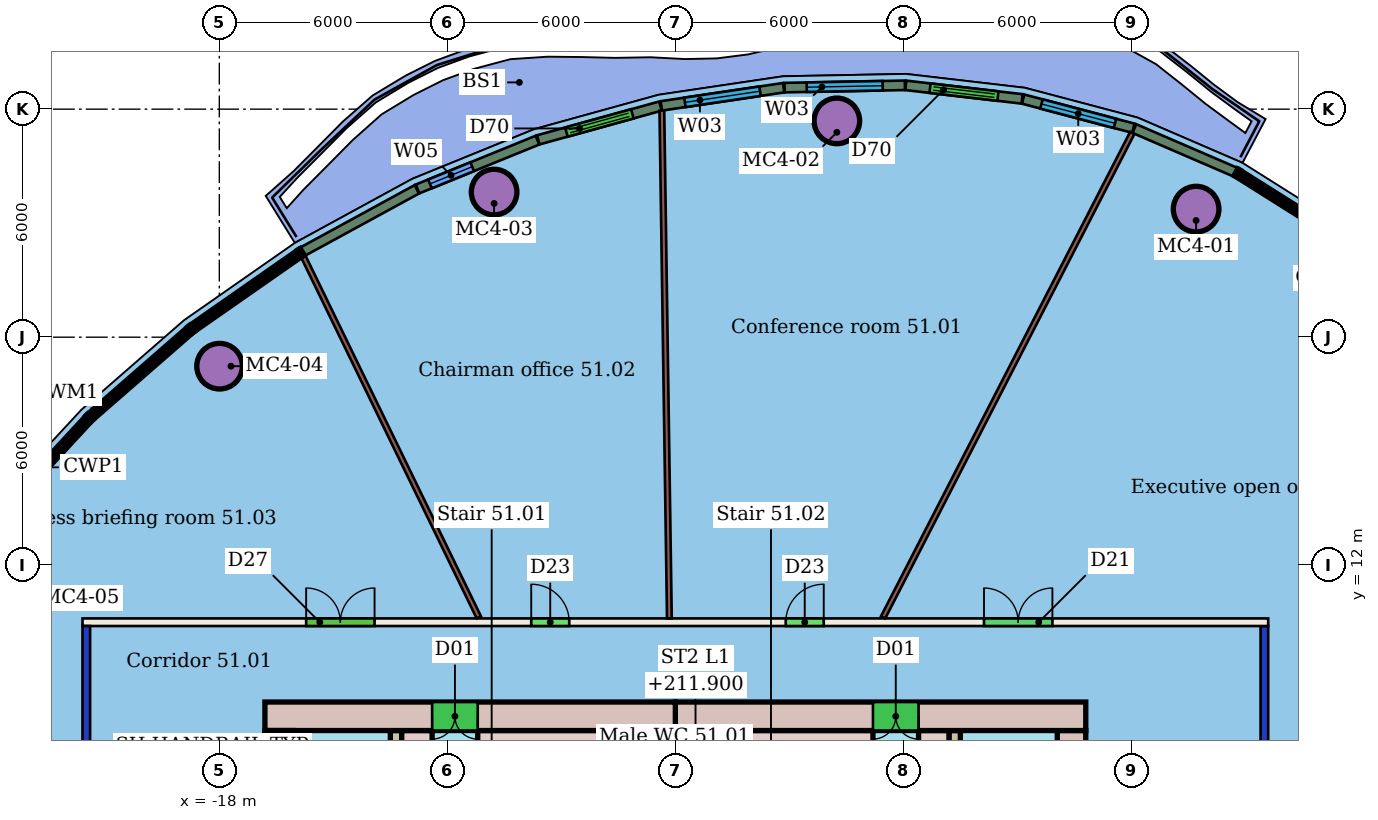
"""IFC4 building model, lengths in metres.
Left out: names, types, materials, properties, quantities, classifications, styles, units other than length and angle.
Written with IfcOpenShell. Run it as: python <this file> out.ifc"""

import sys

from ifc_helpers import new_model, si_unit, direction, frame, frame_2d, origin, origin_2d, place, context, subcontext, project, spatial, rectangle, hollow_circle, extrude, element, fill, save


model = new_model("IFC4")
c1 = context("Model", 3, precision=1e-05, world=origin(), true_north=direction((0.0, 1.0)))
c2 = subcontext(c1, "Body", "Model", "MODEL_VIEW")
j1 = project(units=[si_unit("LENGTHUNIT", "METRE"), si_unit("PLANEANGLEUNIT", "RADIAN")], contexts=[c1])
p1 = place(None, origin())
s1 = spatial("IfcSite", under=j1, at=p1, CompositionType="ELEMENT")
p2 = place(p1, origin())
s2 = spatial("IfcBuilding", under=s1, at=p2, CompositionType="ELEMENT")
p3 = place(p2, frame((0.0, 0.0, 210.1)))
s3 = spatial("IfcBuildingStorey", under=s2, at=p3, CompositionType="ELEMENT", Elevation=210.1)
for number, where, z_axis, x_axis in (
    (1, (7.704, 21.37, 0.0), (0.0, 0.0, 1.0), (1.0, 0.0, 0.0)),
    (2, (-1.75, 23.691, 0.0), (0.0, 0.0, 1.0), (1.0, 0.0, 0.0)),
    (3, (-10.769, 21.819, 0.0), (0.0, 0.0, 1.0), (1.0, 0.0, 0.0)),
    (4, (-17.993, 17.237, 0.0), (0.0, 0.0, 1.0), (1.0, 0.0, 0.0)),
):
    element("IfcColumn", number, at=place(p3, frame(where, z_axis=z_axis, x_axis=x_axis)), inside=s3, PredefinedType="COLUMN", context=c2, shape_type="SweptSolid", body=[
        extrude(hollow_circle(Radius=0.6, WallThickness=0.045, at=origin_2d()), origin(), (0.0, 0.0, 1.0), 3.45),
    ])
p4 = place(p3, frame((-21.5, -10.4, 0.0), z_axis=(0.0, 0.0, 1.0), x_axis=(0.0, 1.0, 0.0)))
e5 = element("IfcWall", 5, at=p4, inside=s3, PredefinedType="PARTITIONING", context=c2, shape_type="SweptSolid", body=[
    extrude(rectangle(XDim=20.8, YDim=0.2, at=frame_2d((10.4, 0.0))), origin(), (0.0, 0.0, 1.0), 3.05),
])
p5 = place(p4, frame((6.277, 0.0, 0.0)))
e6 = element("IfcOpeningElement", 6, at=p5, cuts=e5, PredefinedType="OPENING", context=c2, shape_type="SweptSolid", body=[
    extrude(rectangle(XDim=1.8, YDim=2.1, at=frame_2d((0.9, 1.05))), frame((0.0, 0.11, 0.0), z_axis=(0.0, -1.0, 0.0), x_axis=(1.0, 0.0, 0.0)), (0.0, 0.0, 1.0), 0.22),
])
p6 = place(p3, frame((-21.6, 10.5, 0.0), z_axis=(0.0, 0.0, 1.0), x_axis=(1.0, 0.0, 0.0)))
e7 = element("IfcWall", 7, at=p6, inside=s3, PredefinedType="PARTITIONING", context=c2, shape_type="SweptSolid", body=[
    extrude(rectangle(XDim=31.2, YDim=0.2, at=frame_2d((15.6, 0.0))), origin(), (0.0, 0.0, 1.0), 3.45),
])
p7 = place(p6, frame((18.505, 0.0, 0.0)))
e8 = element("IfcOpeningElement", 8, at=p7, cuts=e7, PredefinedType="OPENING", context=c2, shape_type="SweptSolid", body=[
    extrude(rectangle(XDim=1.0, YDim=2.4, at=frame_2d((0.5, 1.2))), frame((0.0, 0.11, 0.0), z_axis=(0.0, -1.0, 0.0), x_axis=(1.0, 0.0, 0.0)), (0.0, 0.0, 1.0), 0.22),
])
p8 = place(p6, frame((11.808, 0.0, 0.0)))
e9 = element("IfcOpeningElement", 9, at=p8, cuts=e7, PredefinedType="OPENING", context=c2, shape_type="SweptSolid", body=[
    extrude(rectangle(XDim=1.0, YDim=2.4, at=frame_2d((0.5, 1.2))), frame((0.0, 0.11, 0.0), z_axis=(0.0, -1.0, 0.0), x_axis=(1.0, 0.0, 0.0)), (0.0, 0.0, 1.0), 0.22),
])
p9 = place(p6, frame((5.885, 0.0, 0.0)))
e10 = element("IfcOpeningElement", 10, at=p9, cuts=e7, PredefinedType="OPENING", context=c2, shape_type="SweptSolid", body=[
    extrude(rectangle(XDim=1.8, YDim=2.4, at=frame_2d((0.9, 1.2))), frame((0.0, 0.11, 0.0), z_axis=(0.0, -1.0, 0.0), x_axis=(1.0, 0.0, 0.0)), (0.0, 0.0, 1.0), 0.22),
])
p10 = place(p6, frame((23.722, 0.0, 0.0)))
e11 = element("IfcOpeningElement", 11, at=p10, cuts=e7, PredefinedType="OPENING", context=c2, shape_type="SweptSolid", body=[
    extrude(rectangle(XDim=1.8, YDim=2.1, at=frame_2d((0.9, 1.05))), frame((0.0, 0.11, 0.0), z_axis=(0.0, -1.0, 0.0), x_axis=(1.0, 0.0, 0.0)), (0.0, 0.0, 1.0), 0.22),
])
p11 = place(p3, frame((9.5, 10.4, 0.0), z_axis=(0.0, 0.0, 1.0), x_axis=(0.0, -1.0, 0.0)))
e12 = element("IfcWall", 12, at=p11, inside=s3, PredefinedType="PARTITIONING", context=c2, shape_type="SweptSolid", body=[
    extrude(rectangle(XDim=20.8, YDim=0.2, at=frame_2d((10.4, 0.0))), origin(), (0.0, 0.0, 1.0), 3.05),
])
p12 = place(p11, frame((11.307, 0.0, 0.0)))
e13 = element("IfcOpeningElement", 13, at=p12, cuts=e12, PredefinedType="OPENING", context=c2, shape_type="SweptSolid", body=[
    extrude(rectangle(XDim=1.5, YDim=2.1, at=frame_2d((0.75, 1.05))), frame((0.0, 0.11, 0.0), z_axis=(0.0, -1.0, 0.0), x_axis=(1.0, 0.0, 0.0)), (0.0, 0.0, 1.0), 0.22),
])
p13 = place(p3, frame((6.025, 23.377, 0.0), z_axis=(0.0, 0.0, 1.0), x_axis=(-0.457443054826, -0.889238917047, 0.0)))
e14 = element("IfcWall", 14, at=p13, inside=s3, PredefinedType="PARTITIONING", context=c2, shape_type="SweptSolid", body=[
    extrude(rectangle(XDim=14.336, YDim=0.125, at=frame_2d((7.168, 0.0))), origin(), (0.0, 0.0, 1.0), 3.45),
])
p14 = place(p3, frame((-6.355, 23.962, 0.0), z_axis=(0.0, 0.0, 1.0), x_axis=(0.014799117337, -0.999890487066, 0.0)))
e15 = element("IfcWall", 15, at=p14, inside=s3, PredefinedType="PARTITIONING", context=c2, shape_type="SweptSolid", body=[
    extrude(rectangle(XDim=13.363, YDim=0.125, at=frame_2d((6.681, 0.0))), origin(), (0.0, 0.0, 1.0), 3.45),
])
p15 = place(p3, frame((-15.789, 20.12, 0.0), z_axis=(0.0, 0.0, 1.0), x_axis=(0.437510703661, -0.899213202851, 0.0)))
e16 = element("IfcWall", 16, at=p15, inside=s3, PredefinedType="PARTITIONING", context=c2, shape_type="SweptSolid", body=[
    extrude(rectangle(XDim=10.556, YDim=0.125, at=frame_2d((5.278, 0.0))), origin(), (0.0, 0.0, 1.0), 3.45),
])
p16 = place(p3, frame((18.402, 8.403, 0.0), z_axis=(0.0, 0.0, 1.0), x_axis=(-0.945508934878, -0.325596151798, 0.0)))
e17 = element("IfcWall", 17, at=p16, inside=s3, PredefinedType="PARTITIONING", context=c2, shape_type="SweptSolid", body=[
    extrude(rectangle(XDim=9.288, YDim=0.125, at=frame_2d((4.644, 0.0))), origin(), (0.0, 0.0, 1.0), 3.45),
])
p17 = place(p3, frame((8.735, 22.343, 0.0), z_axis=(0.0, 0.0, 1.0), x_axis=(-0.918186540839, 0.396148300794, 0.0)))
e18 = element("IfcWall", 18, at=p17, inside=s3, PredefinedType="SOLIDWALL", context=c2, shape_type="SweptSolid", body=[
    extrude(rectangle(XDim=2.894, YDim=0.25, at=frame_2d((1.447, 0.0))), origin(), (0.0, 0.0, 1.0), 3.1),
])
p18 = place(p3, frame((6.053, 23.498, 0.0), z_axis=(0.0, 0.0, 1.0), x_axis=(-0.966837064295, 0.255393991914, 0.0)))
e19 = element("IfcWall", 19, at=p18, inside=s3, PredefinedType="SOLIDWALL", context=c2, shape_type="SweptSolid", body=[
    extrude(rectangle(XDim=3.002, YDim=0.25, at=frame_2d((1.501, 0.0))), origin(), (0.0, 0.0, 1.0), 3.1),
])
p19 = place(p18, frame((0.501, 0.0, 0.9)))
e20 = element("IfcOpeningElement", 20, at=p19, cuts=e19, PredefinedType="OPENING", context=c2, shape_type="SweptSolid", body=[
    extrude(rectangle(XDim=2.0, YDim=2.1, at=frame_2d((1.0, 1.05))), frame((0.0, 0.135, 0.0), z_axis=(0.0, -1.0, 0.0), x_axis=(1.0, 0.0, 0.0)), (0.0, 0.0, 1.0), 0.27),
])
p20 = place(p3, frame((3.125, 24.27, 0.0), z_axis=(0.0, 0.0, 1.0), x_axis=(-0.993285162652, 0.115691770042, 0.0)))
e21 = element("IfcWall", 21, at=p20, inside=s3, PredefinedType="SOLIDWALL", context=c2, shape_type="SweptSolid", body=[
    extrude(rectangle(XDim=3.081, YDim=0.25, at=frame_2d((1.541, 0.0))), origin(), (0.0, 0.0, 1.0), 3.1),
])
p21 = place(p20, frame((0.641, 0.0, 0.0)))
e22 = element("IfcOpeningElement", 22, at=p21, cuts=e21, PredefinedType="OPENING", context=c2, shape_type="SweptSolid", body=[
    extrude(rectangle(XDim=1.8, YDim=2.4, at=frame_2d((0.9, 1.2))), frame((0.0, 0.135, 0.0), z_axis=(0.0, -1.0, 0.0), x_axis=(1.0, 0.0, 0.0)), (0.0, 0.0, 1.0), 0.27),
])
p22 = place(p3, frame((0.04, 24.627, 0.0), z_axis=(0.0, 0.0, 1.0), x_axis=(-0.999814312732, -0.019270185659, 0.0)))
e23 = element("IfcWall", 23, at=p22, inside=s3, PredefinedType="SOLIDWALL", context=c2, shape_type="SweptSolid", body=[
    extrude(rectangle(XDim=3.167, YDim=0.25, at=frame_2d((1.583, 0.0))), origin(), (0.0, 0.0, 1.0), 3.1),
])
p23 = place(p22, frame((0.584, 0.0, 0.9)))
e24 = element("IfcOpeningElement", 24, at=p23, cuts=e23, PredefinedType="OPENING", context=c2, shape_type="SweptSolid", body=[
    extrude(rectangle(XDim=2.0, YDim=2.1, at=frame_2d((1.0, 1.05))), frame((0.0, 0.135, 0.0), z_axis=(0.0, -1.0, 0.0), x_axis=(1.0, 0.0, 0.0)), (0.0, 0.0, 1.0), 0.27),
])
p24 = place(p3, frame((-3.15, 24.564, 0.0), z_axis=(0.0, 0.0, 1.0), x_axis=(-0.989129217208, -0.147048943092, 0.0)))
e25 = element("IfcWall", 25, at=p24, inside=s3, PredefinedType="SOLIDWALL", context=c2, shape_type="SweptSolid", body=[
    extrude(rectangle(XDim=3.254, YDim=0.25, at=frame_2d((1.627, 0.0))), origin(), (0.0, 0.0, 1.0), 3.1),
])
p25 = place(p24, frame((0.627, 0.0, 0.9)))
e26 = element("IfcOpeningElement", 26, at=p25, cuts=e25, PredefinedType="OPENING", context=c2, shape_type="SweptSolid", body=[
    extrude(rectangle(XDim=2.0, YDim=2.1, at=frame_2d((1.0, 1.05))), frame((0.0, 0.135, 0.0), z_axis=(0.0, -1.0, 0.0), x_axis=(1.0, 0.0, 0.0)), (0.0, 0.0, 1.0), 0.27),
])
p26 = place(p3, frame((-6.392, 24.081, 0.0), z_axis=(0.0, 0.0, 1.0), x_axis=(-0.963820322112, -0.266552784048, 0.0)))
e27 = element("IfcWall", 27, at=p26, inside=s3, PredefinedType="SOLIDWALL", context=c2, shape_type="SweptSolid", body=[
    extrude(rectangle(XDim=3.336, YDim=0.25, at=frame_2d((1.668, 0.0))), origin(), (0.0, 0.0, 1.0), 3.1),
])
p27 = place(p26, frame((0.768, 0.0, 0.0)))
e28 = element("IfcOpeningElement", 28, at=p27, cuts=e27, PredefinedType="OPENING", context=c2, shape_type="SweptSolid", body=[
    extrude(rectangle(XDim=1.8, YDim=2.4, at=frame_2d((0.9, 1.2))), frame((0.0, 0.135, 0.0), z_axis=(0.0, -1.0, 0.0), x_axis=(1.0, 0.0, 0.0)), (0.0, 0.0, 1.0), 0.27),
])
p28 = place(p3, frame((-9.628, 23.185, 0.0), z_axis=(0.0, 0.0, 1.0), x_axis=(-0.926160966141, -0.377128446019, 0.0)))
e29 = element("IfcWall", 29, at=p28, inside=s3, PredefinedType="SOLIDWALL", context=c2, shape_type="SweptSolid", body=[
    extrude(rectangle(XDim=3.407, YDim=0.25, at=frame_2d((1.704, 0.0))), origin(), (0.0, 0.0, 1.0), 3.1),
])
p29 = place(p28, frame((1.854, 0.0, 0.9)))
e30 = element("IfcOpeningElement", 30, at=p29, cuts=e29, PredefinedType="OPENING", context=c2, shape_type="SweptSolid", body=[
    extrude(rectangle(XDim=1.2, YDim=2.1, at=frame_2d((0.6, 1.05))), frame((0.0, 0.135, 0.0), z_axis=(0.0, -1.0, 0.0), x_axis=(1.0, 0.0, 0.0)), (0.0, 0.0, 1.0), 0.27),
])
p30 = place(p3, frame((-12.804, 21.89, 0.0), z_axis=(0.0, 0.0, 1.0), x_axis=(-0.877865563138, -0.478907144503, 0.0)))
e31 = element("IfcWall", 31, at=p30, inside=s3, PredefinedType="SOLIDWALL", context=c2, shape_type="SweptSolid", body=[
    extrude(rectangle(XDim=3.42, YDim=0.25, at=frame_2d((1.71, 0.0))), origin(), (0.0, 0.0, 1.0), 3.1),
])
p31 = place(p3, frame((4.8, 8.025, 0.0), z_axis=(0.0, 0.0, 1.0), x_axis=(-1.0, 0.0, 0.0)))
e32 = element("IfcWall", 32, at=p31, inside=s3, PredefinedType="SHEAR", context=c2, shape_type="SweptSolid", body=[
    extrude(rectangle(XDim=10.8, YDim=0.75, at=frame_2d((5.4, 0.0))), origin(), (0.0, 0.0, 1.0), 3.3),
])
p32 = place(p31, frame((4.4, 0.0, 0.0)))
e33 = element("IfcOpeningElement", 33, at=p32, cuts=e32, PredefinedType="OPENING", context=c2, shape_type="SweptSolid", body=[
    extrude(rectangle(XDim=1.2, YDim=2.1, at=frame_2d((0.6, 1.05))), frame((0.0, 0.385, 0.0), z_axis=(0.0, -1.0, 0.0), x_axis=(1.0, 0.0, 0.0)), (0.0, 0.0, 1.0), 0.77),
])
p33 = place(p3, frame((-6.0, 8.025, 0.0), z_axis=(0.0, 0.0, 1.0), x_axis=(-1.0, 0.0, 0.0)))
e34 = element("IfcWall", 34, at=p33, inside=s3, PredefinedType="SHEAR", context=c2, shape_type="SweptSolid", body=[
    extrude(rectangle(XDim=10.8, YDim=0.75, at=frame_2d((5.4, 0.0))), origin(), (0.0, 0.0, 1.0), 3.3),
])
p34 = place(p33, frame((5.2, 0.0, 0.0)))
e35 = element("IfcOpeningElement", 35, at=p34, cuts=e34, PredefinedType="OPENING", context=c2, shape_type="SweptSolid", body=[
    extrude(rectangle(XDim=1.2, YDim=2.1, at=frame_2d((0.6, 1.05))), frame((0.0, 0.385, 0.0), z_axis=(0.0, -1.0, 0.0), x_axis=(1.0, 0.0, 0.0)), (0.0, 0.0, 1.0), 0.77),
])
p35 = place(p3, frame((-16.425, 7.65, 0.0), z_axis=(0.0, 0.0, 1.0), x_axis=(0.0, -1.0, 0.0)))
e36 = element("IfcWall", 36, at=p35, inside=s3, PredefinedType="SHEAR", context=c2, shape_type="SweptSolid", body=[
    extrude(rectangle(XDim=15.3, YDim=0.75, at=frame_2d((7.65, 0.0))), origin(), (0.0, 0.0, 1.0), 3.3),
])
p36 = place(p35, frame((11.25, 0.0, 0.0)))
e37 = element("IfcOpeningElement", 37, at=p36, cuts=e36, PredefinedType="OPENING", context=c2, shape_type="SweptSolid", body=[
    extrude(rectangle(XDim=1.2, YDim=2.1, at=frame_2d((0.6, 1.05))), frame((0.0, 0.385, 0.0), z_axis=(0.0, -1.0, 0.0), x_axis=(1.0, 0.0, 0.0)), (0.0, 0.0, 1.0), 0.77),
])
p37 = place(p35, frame((2.85, 0.0, 0.0)))
e38 = element("IfcOpeningElement", 38, at=p37, cuts=e36, PredefinedType="OPENING", context=c2, shape_type="SweptSolid", body=[
    extrude(rectangle(XDim=1.2, YDim=2.1, at=frame_2d((0.6, 1.05))), frame((0.0, 0.385, 0.0), z_axis=(0.0, -1.0, 0.0), x_axis=(1.0, 0.0, 0.0)), (0.0, 0.0, 1.0), 0.77),
])
p38 = place(p3, frame((4.425, -7.65, 0.0), z_axis=(0.0, 0.0, 1.0), x_axis=(0.0, 1.0, 0.0)))
e39 = element("IfcWall", 39, at=p38, inside=s3, PredefinedType="SHEAR", context=c2, shape_type="SweptSolid", body=[
    extrude(rectangle(XDim=15.3, YDim=0.75, at=frame_2d((7.65, 0.0))), origin(), (0.0, 0.0, 1.0), 3.3),
])
p39 = place(p38, frame((2.85, 0.0, 0.0)))
e40 = element("IfcOpeningElement", 40, at=p39, cuts=e39, PredefinedType="OPENING", context=c2, shape_type="SweptSolid", body=[
    extrude(rectangle(XDim=1.2, YDim=2.1, at=frame_2d((0.6, 1.05))), frame((0.0, 0.385, 0.0), z_axis=(0.0, -1.0, 0.0), x_axis=(1.0, 0.0, 0.0)), (0.0, 0.0, 1.0), 0.77),
])
p40 = place(p38, frame((11.25, 0.0, 0.0)))
e41 = element("IfcOpeningElement", 41, at=p40, cuts=e39, PredefinedType="OPENING", context=c2, shape_type="SweptSolid", body=[
    extrude(rectangle(XDim=1.2, YDim=2.1, at=frame_2d((0.6, 1.05))), frame((0.0, 0.385, 0.0), z_axis=(0.0, -1.0, 0.0), x_axis=(1.0, 0.0, 0.0)), (0.0, 0.0, 1.0), 0.77),
])
p41 = place(p3, frame((-13.35, 7.65, 0.0), z_axis=(0.0, 0.0, 1.0), x_axis=(0.0, -1.0, 0.0)))
e42 = element("IfcWall", 42, at=p41, inside=s3, PredefinedType="SHEAR", context=c2, shape_type="SweptSolid", body=[
    extrude(rectangle(XDim=15.3, YDim=0.3, at=frame_2d((7.65, 0.0))), origin(), (0.0, 0.0, 1.0), 3.3),
])
p42 = place(p41, frame((6.9, 0.0, 0.0)))
e43 = element("IfcOpeningElement", 43, at=p42, cuts=e42, PredefinedType="OPENING", context=c2, shape_type="SweptSolid", body=[
    extrude(rectangle(XDim=1.5, YDim=2.1, at=frame_2d((0.75, 1.05))), frame((0.0, 0.16, 0.0), z_axis=(0.0, -1.0, 0.0), x_axis=(1.0, 0.0, 0.0)), (0.0, 0.0, 1.0), 0.32),
])
p43 = place(p3, frame((1.35, -7.65, 0.0), z_axis=(0.0, 0.0, 1.0), x_axis=(0.0, 1.0, 0.0)))
e44 = element("IfcWall", 44, at=p43, inside=s3, PredefinedType="SHEAR", context=c2, shape_type="SweptSolid", body=[
    extrude(rectangle(XDim=15.3, YDim=0.3, at=frame_2d((7.65, 0.0))), origin(), (0.0, 0.0, 1.0), 3.3),
])
p44 = place(p43, frame((1.56, 0.0, 0.0)))
e45 = element("IfcOpeningElement", 45, at=p44, cuts=e44, PredefinedType="OPENING", context=c2, shape_type="SweptSolid", body=[
    extrude(rectangle(XDim=1.0, YDim=2.1, at=frame_2d((0.5, 1.05))), frame((0.0, 0.16, 0.0), z_axis=(0.0, -1.0, 0.0), x_axis=(1.0, 0.0, 0.0)), (0.0, 0.0, 1.0), 0.32),
])
p45 = place(p43, frame((6.9, 0.0, 0.0)))
e46 = element("IfcOpeningElement", 46, at=p45, cuts=e44, PredefinedType="OPENING", context=c2, shape_type="SweptSolid", body=[
    extrude(rectangle(XDim=1.5, YDim=2.1, at=frame_2d((0.75, 1.05))), frame((0.0, 0.16, 0.0), z_axis=(0.0, -1.0, 0.0), x_axis=(1.0, 0.0, 0.0)), (0.0, 0.0, 1.0), 0.32),
])
p46 = place(p3, frame((-6.0, 3.88, 0.0), z_axis=(0.0, 0.0, 1.0), x_axis=(0.0, 1.0, 0.0)))
e47 = element("IfcWall", 47, at=p46, inside=s3, PredefinedType="SHEAR", context=c2, shape_type="SweptSolid", body=[
    extrude(rectangle(XDim=3.77, YDim=0.3, at=frame_2d((1.885, 0.0))), origin(), (0.0, 0.0, 1.0), 3.3),
])
p47 = place(p3, frame((-13.2, 7.475, 0.0), z_axis=(0.0, 0.0, 1.0), x_axis=(1.0, 0.0, 0.0)))
e48 = element("IfcWall", 48, at=p47, inside=s3, PredefinedType="SHEAR", context=c2, shape_type="SweptSolid", body=[
    extrude(rectangle(XDim=0.8, YDim=0.35, at=frame_2d((0.4, 0.0))), origin(), (0.0, 0.0, 1.0), 3.3),
])
for number, where, z_axis, x_axis in (
    (49, (-11.2, 7.475, 0.0), (0.0, 0.0, 1.0), (1.0, 0.0, 0.0)),
    (50, (-5.85, 7.475, 0.0), (0.0, 0.0, 1.0), (1.0, 0.0, 0.0)),
):
    element("IfcWall", number, at=place(p3, frame(where, z_axis=z_axis, x_axis=x_axis)), inside=s3, PredefinedType="SHEAR", context=c2, shape_type="SweptSolid", body=[
        extrude(rectangle(XDim=5.05, YDim=0.35, at=frame_2d((2.525, 0.0))), origin(), (0.0, 0.0, 1.0), 3.3),
    ])
p48 = place(p3, frame((0.4, 7.475, 0.0), z_axis=(0.0, 0.0, 1.0), x_axis=(1.0, 0.0, 0.0)))
e51 = element("IfcWall", 51, at=p48, inside=s3, PredefinedType="SHEAR", context=c2, shape_type="SweptSolid", body=[
    extrude(rectangle(XDim=0.8, YDim=0.35, at=frame_2d((0.4, 0.0))), origin(), (0.0, 0.0, 1.0), 3.3),
])
p49 = place(p7, origin())
e52 = element("IfcDoor", 52, at=p49, inside=s3, OperationType="SINGLE_SWING_RIGHT", PredefinedType="DOOR", context=c2, shape_type="SweptSolid", body=[
    extrude(rectangle(XDim=1.0, YDim=2.4, at=frame_2d((0.5, 1.2))), frame((0.0, 0.025, 0.0), z_axis=(0.0, -1.0, 0.0), x_axis=(1.0, 0.0, 0.0)), (0.0, 0.0, 1.0), 0.05),
])
fill(e8, e52)
p50 = place(p8, origin())
e53 = element("IfcDoor", 53, at=p50, inside=s3, OperationType="SINGLE_SWING_LEFT", PredefinedType="DOOR", context=c2, shape_type="SweptSolid", body=[
    extrude(rectangle(XDim=1.0, YDim=2.4, at=frame_2d((0.5, 1.2))), frame((0.0, 0.025, 0.0), z_axis=(0.0, -1.0, 0.0), x_axis=(1.0, 0.0, 0.0)), (0.0, 0.0, 1.0), 0.05),
])
fill(e9, e53)
p51 = place(p9, origin())
e54 = element("IfcDoor", 54, at=p51, inside=s3, OperationType="DOUBLE_DOOR_SINGLE_SWING", PredefinedType="DOOR", context=c2, shape_type="SweptSolid", body=[
    extrude(rectangle(XDim=1.8, YDim=2.4, at=frame_2d((0.9, 1.2))), frame((0.0, 0.025, 0.0), z_axis=(0.0, -1.0, 0.0), x_axis=(1.0, 0.0, 0.0)), (0.0, 0.0, 1.0), 0.05),
])
fill(e10, e54)
p52 = place(p10, origin())
e55 = element("IfcDoor", 55, at=p52, inside=s3, OperationType="DOUBLE_DOOR_SINGLE_SWING", PredefinedType="DOOR", context=c2, shape_type="SweptSolid", body=[
    extrude(rectangle(XDim=1.8, YDim=2.1, at=frame_2d((0.9, 1.05))), frame((0.0, 0.025, 0.0), z_axis=(0.0, -1.0, 0.0), x_axis=(1.0, 0.0, 0.0)), (0.0, 0.0, 1.0), 0.05),
])
fill(e11, e55)
p53 = place(p19, origin())
e56 = element("IfcWindow", 56, at=p53, inside=s3, PartitioningType="SINGLE_PANEL", PredefinedType="WINDOW", context=c2, shape_type="SweptSolid", body=[
    extrude(rectangle(XDim=2.0, YDim=2.1, at=frame_2d((1.0, 1.05))), frame((0.0, 0.03, 0.0), z_axis=(0.0, -1.0, 0.0), x_axis=(1.0, 0.0, 0.0)), (0.0, 0.0, 1.0), 0.06),
])
fill(e20, e56)
p54 = place(p21, origin())
e57 = element("IfcDoor", 57, at=p54, inside=s3, OperationType="DOUBLE_DOOR_SLIDING", PredefinedType="DOOR", context=c2, shape_type="SweptSolid", body=[
    extrude(rectangle(XDim=1.8, YDim=2.4, at=frame_2d((0.9, 1.2))), frame((0.0, 0.025, 0.0), z_axis=(0.0, -1.0, 0.0), x_axis=(1.0, 0.0, 0.0)), (0.0, 0.0, 1.0), 0.05),
])
fill(e22, e57)
p55 = place(p23, origin())
e58 = element("IfcWindow", 58, at=p55, inside=s3, PartitioningType="SINGLE_PANEL", PredefinedType="WINDOW", context=c2, shape_type="SweptSolid", body=[
    extrude(rectangle(XDim=2.0, YDim=2.1, at=frame_2d((1.0, 1.05))), frame((0.0, 0.03, 0.0), z_axis=(0.0, -1.0, 0.0), x_axis=(1.0, 0.0, 0.0)), (0.0, 0.0, 1.0), 0.06),
])
fill(e24, e58)
p56 = place(p25, origin())
e59 = element("IfcWindow", 59, at=p56, inside=s3, PartitioningType="SINGLE_PANEL", PredefinedType="WINDOW", context=c2, shape_type="SweptSolid", body=[
    extrude(rectangle(XDim=2.0, YDim=2.1, at=frame_2d((1.0, 1.05))), frame((0.0, 0.03, 0.0), z_axis=(0.0, -1.0, 0.0), x_axis=(1.0, 0.0, 0.0)), (0.0, 0.0, 1.0), 0.06),
])
fill(e26, e59)
p57 = place(p27, origin())
e60 = element("IfcDoor", 60, at=p57, inside=s3, OperationType="DOUBLE_DOOR_SLIDING", PredefinedType="DOOR", context=c2, shape_type="SweptSolid", body=[
    extrude(rectangle(XDim=1.8, YDim=2.4, at=frame_2d((0.9, 1.2))), frame((0.0, 0.025, 0.0), z_axis=(0.0, -1.0, 0.0), x_axis=(1.0, 0.0, 0.0)), (0.0, 0.0, 1.0), 0.05),
])
fill(e28, e60)
p58 = place(p29, origin())
e61 = element("IfcWindow", 61, at=p58, inside=s3, PartitioningType="SINGLE_PANEL", PredefinedType="WINDOW", context=c2, shape_type="SweptSolid", body=[
    extrude(rectangle(XDim=1.2, YDim=2.1, at=frame_2d((0.6, 1.05))), frame((0.0, 0.03, 0.0), z_axis=(0.0, -1.0, 0.0), x_axis=(1.0, 0.0, 0.0)), (0.0, 0.0, 1.0), 0.06),
])
fill(e30, e61)
p59 = place(p32, origin())
e62 = element("IfcDoor", 62, at=p59, inside=s3, OperationType="DOUBLE_DOOR_SINGLE_SWING", PredefinedType="NOTDEFINED", context=c2, shape_type="SweptSolid", body=[
    extrude(rectangle(XDim=1.2, YDim=2.1, at=frame_2d((0.6, 1.05))), frame((0.0, 0.025, 0.0), z_axis=(0.0, -1.0, 0.0), x_axis=(1.0, 0.0, 0.0)), (0.0, 0.0, 1.0), 0.05),
])
fill(e33, e62)
p60 = place(p34, origin())
e63 = element("IfcDoor", 63, at=p60, inside=s3, OperationType="DOUBLE_DOOR_SINGLE_SWING", PredefinedType="NOTDEFINED", context=c2, shape_type="SweptSolid", body=[
    extrude(rectangle(XDim=1.2, YDim=2.1, at=frame_2d((0.6, 1.05))), frame((0.0, 0.025, 0.0), z_axis=(0.0, -1.0, 0.0), x_axis=(1.0, 0.0, 0.0)), (0.0, 0.0, 1.0), 0.05),
])
fill(e35, e63)
save(model, sys.argv[1])
